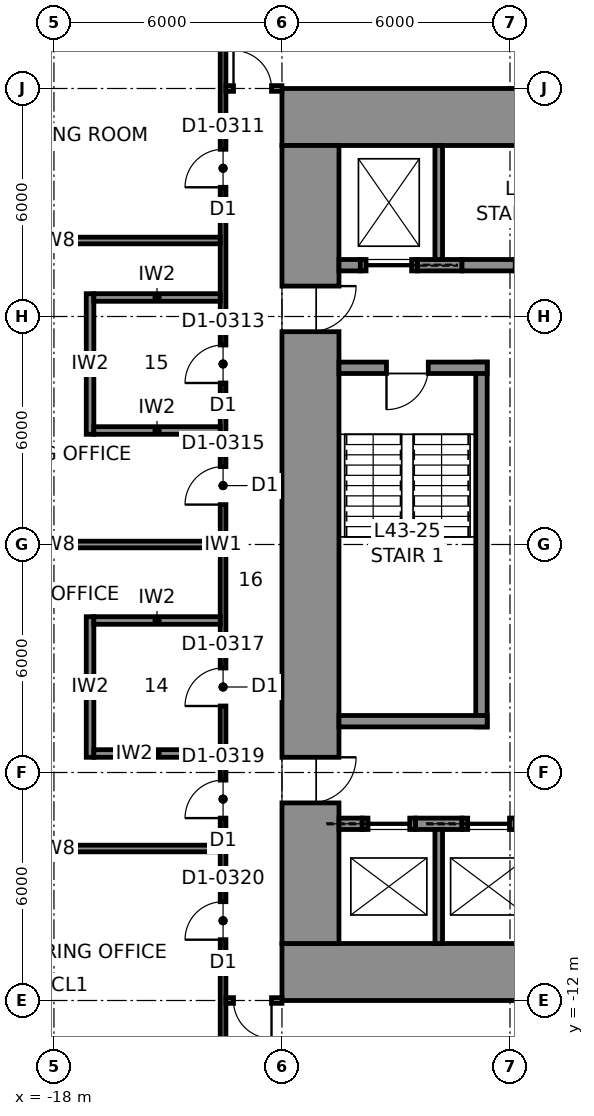
"""IFC4 building model, lengths in metres.
Left out: names, types, materials, properties, quantities, classifications, styles, units other than length and angle.
Written with IfcOpenShell. Run it as: python <this file> out.ifc"""

import sys

from ifc_helpers import new_model, si_unit, direction, frame, frame_2d, origin, place, context, subcontext, project, spatial, rectangle, extrude, element, fill, save


model = new_model("IFC4")
c1 = context("Model", 3, precision=1e-05, world=origin(), true_north=direction((0.0, 1.0)))
c2 = subcontext(c1, "Body", "Model", "MODEL_VIEW")
j1 = project(units=[si_unit("LENGTHUNIT", "METRE"), si_unit("PLANEANGLEUNIT", "RADIAN")], contexts=[c1])
p1 = place(None, origin())
s1 = spatial("IfcSite", under=j1, at=p1, CompositionType="ELEMENT")
p2 = place(p1, origin())
s2 = spatial("IfcBuilding", under=s1, at=p2, CompositionType="ELEMENT")
p3 = place(p2, frame((0.0, 0.0, 201.8)))
s3 = spatial("IfcBuildingStorey", under=s2, at=p3, CompositionType="ELEMENT", Elevation=201.8)
for number, where, z_axis, x_axis in (
    (1, (-12.0, 11.25, 0.0), (0.0, 0.0, 1.0), (1.0, 0.0, 0.0)),
    (2, (12.0, -11.25, 0.0), (0.0, 0.0, 1.0), (-1.0, 0.0, 0.0)),
):
    element("IfcWall", number, at=place(p3, frame(where, z_axis=z_axis, x_axis=x_axis)), inside=s3, PredefinedType="SHEAR", context=c2, shape_type="SweptSolid", body=[
        extrude(rectangle(XDim=24.0, YDim=1.5, at=frame_2d((12.0, 0.0))), origin(), (0.0, 0.0, 1.0), 4.0),
    ])
p4 = place(p3, frame((-11.25, -10.5, 0.0), z_axis=(0.0, 0.0, 1.0), x_axis=(0.0, 1.0, 0.0)))
e3 = element("IfcWall", 3, at=p4, inside=s3, PredefinedType="SHEAR", context=c2, shape_type="SweptSolid", body=[
    extrude(rectangle(XDim=21.0, YDim=1.5, at=frame_2d((10.5, 0.0))), origin(), (0.0, 0.0, 1.0), 4.0),
])
p5 = place(p4, frame((16.1, 0.0, 0.0)))
e4 = element("IfcOpeningElement", 4, at=p5, cuts=e3, PredefinedType="OPENING", context=c2, shape_type="SweptSolid", body=[
    extrude(rectangle(XDim=1.2, YDim=2.3, at=frame_2d((0.6, 1.15))), frame((0.0, 0.76, 0.0), z_axis=(0.0, -1.0, 0.0), x_axis=(1.0, 0.0, 0.0)), (0.0, 0.0, 1.0), 1.52),
])
p6 = place(p4, frame((3.7, 0.0, 0.0)))
e5 = element("IfcOpeningElement", 5, at=p6, cuts=e3, PredefinedType="OPENING", context=c2, shape_type="SweptSolid", body=[
    extrude(rectangle(XDim=1.2, YDim=2.3, at=frame_2d((0.6, 1.15))), frame((0.0, 0.76, 0.0), z_axis=(0.0, -1.0, 0.0), x_axis=(1.0, 0.0, 0.0)), (0.0, 0.0, 1.0), 1.52),
])
p7 = place(p3, frame((-10.5, 7.35, 0.0), z_axis=(0.0, 0.0, 1.0), x_axis=(1.0, 0.0, 0.0)))
e6 = element("IfcWall", 6, at=p7, inside=s3, PredefinedType="SHEAR", context=c2, shape_type="SweptSolid", body=[
    extrude(rectangle(XDim=0.562, YDim=0.3, at=frame_2d((0.281, 0.0))), origin(), (0.0, 0.0, 1.0), 4.0),
])
p8 = place(p3, frame((-8.438, 7.35, 0.0), z_axis=(0.0, 0.0, 1.0), x_axis=(1.0, 0.0, 0.0)))
e7 = element("IfcWall", 7, at=p8, inside=s3, PredefinedType="SHEAR", context=c2, shape_type="SweptSolid", body=[
    extrude(rectangle(XDim=1.175, YDim=0.3, at=frame_2d((0.587, 0.0))), origin(), (0.0, 0.0, 1.0), 4.0),
])
p9 = place(p3, frame((-9.938, 7.35, 0.0), z_axis=(0.0, 0.0, 1.0), x_axis=(1.0, 0.0, 0.0)))
e8 = element("IfcWall", 8, at=p9, inside=s3, PredefinedType="PARTITIONING", context=c2, shape_type="SweptSolid", body=[
    extrude(rectangle(XDim=1.5, YDim=0.3, at=frame_2d((0.75, 0.0))), origin(), (0.0, 0.0, 1.0), 4.0),
])
p10 = place(p9, frame((0.15, 0.0, 0.0)))
e9 = element("IfcOpeningElement", 9, at=p10, cuts=e8, PredefinedType="OPENING", context=c2, shape_type="SweptSolid", body=[
    extrude(rectangle(XDim=1.2, YDim=2.3, at=frame_2d((0.6, 1.15))), frame((0.0, 0.16, 0.0), z_axis=(0.0, -1.0, 0.0), x_axis=(1.0, 0.0, 0.0)), (0.0, 0.0, 1.0), 0.32),
])
p11 = place(p3, frame((-7.262, 7.35, 0.0), z_axis=(0.0, 0.0, 1.0), x_axis=(1.0, 0.0, 0.0)))
e10 = element("IfcWall", 10, at=p11, inside=s3, PredefinedType="PARTITIONING", context=c2, shape_type="SweptSolid", body=[
    extrude(rectangle(XDim=1.4, YDim=0.3, at=frame_2d((0.7, 0.0))), origin(), (0.0, 0.0, 1.0), 4.0),
])
p12 = place(p3, frame((-7.875, 7.5, 0.0), z_axis=(0.0, 0.0, 1.0), x_axis=(0.0, 1.0, 0.0)))
e11 = element("IfcWall", 11, at=p12, inside=s3, PredefinedType="PARTITIONING", context=c2, shape_type="SweptSolid", body=[
    extrude(rectangle(XDim=3.0, YDim=0.2, at=frame_2d((1.5, 0.0))), origin(), (0.0, 0.0, 1.0), 4.0),
])
p13 = place(p3, frame((-10.5, -7.35, 0.0), z_axis=(0.0, 0.0, 1.0), x_axis=(1.0, 0.0, 0.0)))
e12 = element("IfcWall", 12, at=p13, inside=s3, PredefinedType="SHEAR", context=c2, shape_type="SweptSolid", body=[
    extrude(rectangle(XDim=0.613, YDim=0.3, at=frame_2d((0.306, 0.0))), origin(), (0.0, 0.0, 1.0), 4.0),
])
p14 = place(p3, frame((-8.488, -7.35, 0.0), z_axis=(0.0, 0.0, 1.0), x_axis=(1.0, 0.0, 0.0)))
e13 = element("IfcWall", 13, at=p14, inside=s3, PredefinedType="SHEAR", context=c2, shape_type="SweptSolid", body=[
    extrude(rectangle(XDim=1.225, YDim=0.3, at=frame_2d((0.613, 0.0))), origin(), (0.0, 0.0, 1.0), 4.0),
])
p15 = place(p3, frame((-9.887, -7.35, 0.0), z_axis=(0.0, 0.0, 1.0), x_axis=(1.0, 0.0, 0.0)))
e14 = element("IfcWall", 14, at=p15, inside=s3, PredefinedType="PARTITIONING", context=c2, shape_type="SweptSolid", body=[
    extrude(rectangle(XDim=1.4, YDim=0.3, at=frame_2d((0.7, 0.0))), origin(), (0.0, 0.0, 1.0), 4.0),
])
p16 = place(p15, frame((0.15, 0.0, 0.0)))
e15 = element("IfcOpeningElement", 15, at=p16, cuts=e14, PredefinedType="OPENING", context=c2, shape_type="SweptSolid", body=[
    extrude(rectangle(XDim=1.1, YDim=2.3, at=frame_2d((0.55, 1.15))), frame((0.0, 0.16, 0.0), z_axis=(0.0, -1.0, 0.0), x_axis=(1.0, 0.0, 0.0)), (0.0, 0.0, 1.0), 0.32),
])
p17 = place(p3, frame((-7.262, -7.35, 0.0), z_axis=(0.0, 0.0, 1.0), x_axis=(1.0, 0.0, 0.0)))
e16 = element("IfcWall", 16, at=p17, inside=s3, PredefinedType="PARTITIONING", context=c2, shape_type="SweptSolid", body=[
    extrude(rectangle(XDim=1.4, YDim=0.3, at=frame_2d((0.7, 0.0))), origin(), (0.0, 0.0, 1.0), 4.0),
])
p18 = place(p17, frame((0.15, 0.0, 0.0)))
e17 = element("IfcOpeningElement", 17, at=p18, cuts=e16, PredefinedType="OPENING", context=c2, shape_type="SweptSolid", body=[
    extrude(rectangle(XDim=1.1, YDim=2.3, at=frame_2d((0.55, 1.15))), frame((0.0, 0.16, 0.0), z_axis=(0.0, -1.0, 0.0), x_axis=(1.0, 0.0, 0.0)), (0.0, 0.0, 1.0), 0.32),
])
p19 = place(p3, frame((-7.875, -10.5, 0.0), z_axis=(0.0, 0.0, 1.0), x_axis=(0.0, 1.0, 0.0)))
e18 = element("IfcWall", 18, at=p19, inside=s3, PredefinedType="PARTITIONING", context=c2, shape_type="SweptSolid", body=[
    extrude(rectangle(XDim=3.0, YDim=0.2, at=frame_2d((1.5, 0.0))), origin(), (0.0, 0.0, 1.0), 4.0),
])
p20 = place(p3, frame((-13.55, 13.575, 0.0), z_axis=(0.0, 0.0, 1.0), x_axis=(0.0, -1.0, 0.0)))
e19 = element("IfcWall", 19, at=p20, inside=s3, PredefinedType="PARTITIONING", context=c2, shape_type="SweptSolid", body=[
    extrude(rectangle(XDim=27.15, YDim=0.15, at=frame_2d((13.575, 0.0))), origin(), (0.0, 0.0, 1.0), 3.83),
])
p21 = place(p20, frame((22.975, 0.0, 0.0)))
e20 = element("IfcOpeningElement", 20, at=p21, cuts=e19, PredefinedType="OPENING", context=c2, shape_type="SweptSolid", body=[
    extrude(rectangle(XDim=1.0, YDim=2.3, at=frame_2d((0.5, 1.15))), frame((0.0, 0.085, 0.0), z_axis=(0.0, -1.0, 0.0), x_axis=(1.0, 0.0, 0.0)), (0.0, 0.0, 1.0), 0.17),
])
p22 = place(p20, frame((19.775, 0.0, 0.0)))
e21 = element("IfcOpeningElement", 21, at=p22, cuts=e19, PredefinedType="OPENING", context=c2, shape_type="SweptSolid", body=[
    extrude(rectangle(XDim=1.0, YDim=2.3, at=frame_2d((0.5, 1.15))), frame((0.0, 0.085, 0.0), z_axis=(0.0, -1.0, 0.0), x_axis=(1.0, 0.0, 0.0)), (0.0, 0.0, 1.0), 0.17),
])
p23 = place(p20, frame((11.525, 0.0, 0.0)))
e22 = element("IfcOpeningElement", 22, at=p23, cuts=e19, PredefinedType="OPENING", context=c2, shape_type="SweptSolid", body=[
    extrude(rectangle(XDim=1.0, YDim=2.3, at=frame_2d((0.5, 1.15))), frame((0.0, 0.085, 0.0), z_axis=(0.0, -1.0, 0.0), x_axis=(1.0, 0.0, 0.0)), (0.0, 0.0, 1.0), 0.17),
])
p24 = place(p20, frame((3.175, 0.0, 0.0)))
e23 = element("IfcOpeningElement", 23, at=p24, cuts=e19, PredefinedType="OPENING", context=c2, shape_type="SweptSolid", body=[
    extrude(rectangle(XDim=1.0, YDim=2.3, at=frame_2d((0.5, 1.15))), frame((0.0, 0.085, 0.0), z_axis=(0.0, -1.0, 0.0), x_axis=(1.0, 0.0, 0.0)), (0.0, 0.0, 1.0), 0.17),
])
p25 = place(p20, frame((16.825, 0.0, 0.0)))
e24 = element("IfcOpeningElement", 24, at=p25, cuts=e19, PredefinedType="OPENING", context=c2, shape_type="SweptSolid", body=[
    extrude(rectangle(XDim=1.0, YDim=2.3, at=frame_2d((0.5, 1.15))), frame((0.0, 0.085, 0.0), z_axis=(0.0, -1.0, 0.0), x_axis=(1.0, 0.0, 0.0)), (0.0, 0.0, 1.0), 0.17),
])
p26 = place(p20, frame((8.325, 0.0, 0.0)))
e25 = element("IfcOpeningElement", 25, at=p26, cuts=e19, PredefinedType="OPENING", context=c2, shape_type="SweptSolid", body=[
    extrude(rectangle(XDim=1.0, YDim=2.3, at=frame_2d((0.5, 1.15))), frame((0.0, 0.085, 0.0), z_axis=(0.0, -1.0, 0.0), x_axis=(1.0, 0.0, 0.0)), (0.0, 0.0, 1.0), 0.17),
])
p27 = place(p3, frame((-13.475, 12.0, 0.0), z_axis=(0.0, 0.0, 1.0), x_axis=(1.0, 0.0, 0.0)))
e26 = element("IfcWall", 26, at=p27, inside=s3, PredefinedType="PARTITIONING", context=c2, shape_type="SweptSolid", body=[
    extrude(rectangle(XDim=1.475, YDim=0.15, at=frame_2d((0.738, 0.0))), origin(), (0.0, 0.0, 1.0), 3.83),
])
p28 = place(p27, frame((0.2, 0.0, 0.0)))
e27 = element("IfcOpeningElement", 27, at=p28, cuts=e26, PredefinedType="OPENING", context=c2, shape_type="SweptSolid", body=[
    extrude(rectangle(XDim=1.0, YDim=2.3, at=frame_2d((0.5, 1.15))), frame((0.0, 0.085, 0.0), z_axis=(0.0, -1.0, 0.0), x_axis=(1.0, 0.0, 0.0)), (0.0, 0.0, 1.0), 0.17),
])
p29 = place(p3, frame((-12.0, -12.0, 0.0), z_axis=(0.0, 0.0, 1.0), x_axis=(-1.0, 0.0, 0.0)))
e28 = element("IfcWall", 28, at=p29, inside=s3, PredefinedType="PARTITIONING", context=c2, shape_type="SweptSolid", body=[
    extrude(rectangle(XDim=1.475, YDim=0.15, at=frame_2d((0.738, 0.0))), origin(), (0.0, 0.0, 1.0), 3.83),
])
p30 = place(p29, frame((0.275, 0.0, 0.0)))
e29 = element("IfcOpeningElement", 29, at=p30, cuts=e28, PredefinedType="OPENING", context=c2, shape_type="SweptSolid", body=[
    extrude(rectangle(XDim=1.0, YDim=2.3, at=frame_2d((0.5, 1.15))), frame((0.0, 0.085, 0.0), z_axis=(0.0, -1.0, 0.0), x_axis=(1.0, 0.0, 0.0)), (0.0, 0.0, 1.0), 0.17),
])
for number, where, z_axis, x_axis in (
    (30, (-13.625, -8.0, 0.0), (0.0, 0.0, 1.0), (-1.0, 0.0, 0.0)),
    (31, (-13.625, 0.0, 0.0), (0.0, 0.0, 1.0), (-1.0, 0.0, 0.0)),
    (32, (-13.625, 8.0, 0.0), (0.0, 0.0, 1.0), (-1.0, 0.0, 0.0)),
):
    element("IfcWall", number, at=place(p3, frame(where, z_axis=z_axis, x_axis=x_axis)), inside=s3, PredefinedType="PARTITIONING", context=c2, shape_type="SweptSolid", body=[
        extrude(rectangle(XDim=8.609, YDim=0.175, at=frame_2d((4.305, 0.0))), origin(), (0.0, 0.0, 1.0), 2.94),
    ])
p31 = place(p3, frame((-17.05, -5.6, 0.0), z_axis=(0.0, 0.0, 1.0), x_axis=(0.0, 1.0, 0.0)))
e33 = element("IfcWall", 33, at=p31, inside=s3, PredefinedType="PARTITIONING", context=c2, shape_type="SweptSolid", body=[
    extrude(rectangle(XDim=3.7, YDim=0.2, at=frame_2d((1.85, 0.0))), origin(), (0.0, 0.0, 1.0), 3.83),
])
for number, where, z_axis, x_axis in (
    (34, (-13.625, -5.5, 0.0), (0.0, 0.0, 1.0), (-1.0, 0.0, 0.0)),
    (35, (-13.625, -2.0, 0.0), (0.0, 0.0, 1.0), (-1.0, 0.0, 0.0)),
):
    element("IfcWall", number, at=place(p3, frame(where, z_axis=z_axis, x_axis=x_axis)), inside=s3, PredefinedType="PARTITIONING", context=c2, shape_type="SweptSolid", body=[
        extrude(rectangle(XDim=3.325, YDim=0.2, at=frame_2d((1.663, 0.0))), origin(), (0.0, 0.0, 1.0), 3.83),
    ])
p32 = place(p3, frame((-17.05, 2.9, 0.0), z_axis=(0.0, 0.0, 1.0), x_axis=(0.0, 1.0, 0.0)))
e36 = element("IfcWall", 36, at=p32, inside=s3, PredefinedType="PARTITIONING", context=c2, shape_type="SweptSolid", body=[
    extrude(rectangle(XDim=3.7, YDim=0.2, at=frame_2d((1.85, 0.0))), origin(), (0.0, 0.0, 1.0), 3.83),
])
for number, where, z_axis, x_axis in (
    (37, (-13.625, 3.0, 0.0), (0.0, 0.0, 1.0), (-1.0, 0.0, 0.0)),
    (38, (-13.625, 6.5, 0.0), (0.0, 0.0, 1.0), (-1.0, 0.0, 0.0)),
):
    element("IfcWall", number, at=place(p3, frame(where, z_axis=z_axis, x_axis=x_axis)), inside=s3, PredefinedType="PARTITIONING", context=c2, shape_type="SweptSolid", body=[
        extrude(rectangle(XDim=3.325, YDim=0.2, at=frame_2d((1.663, 0.0))), origin(), (0.0, 0.0, 1.0), 3.83),
    ])
p33 = place(p3, frame((-6.75, -4.8, 0.0), z_axis=(0.0, 0.0, 1.0), x_axis=(0.0, 1.0, 0.0)))
e39 = element("IfcWall", 39, at=p33, inside=s3, PredefinedType="SOLIDWALL", context=c2, shape_type="SweptSolid", body=[
    extrude(rectangle(XDim=9.6, YDim=0.3, at=frame_2d((4.8, 0.0))), origin(), (0.0, 0.0, 1.0), 3.75),
])
p34 = place(p3, frame((-10.5, 4.65, 0.0), z_axis=(0.0, 0.0, 1.0), x_axis=(1.0, 0.0, 0.0)))
e40 = element("IfcWall", 40, at=p34, inside=s3, PredefinedType="SOLIDWALL", context=c2, shape_type="SweptSolid", body=[
    extrude(rectangle(XDim=3.9, YDim=0.3, at=frame_2d((1.95, 0.0))), origin(), (0.0, 0.0, 1.0), 3.75),
])
p35 = place(p34, frame((1.25, 0.0, 0.0)))
e41 = element("IfcOpeningElement", 41, at=p35, cuts=e40, PredefinedType="OPENING", context=c2, shape_type="SweptSolid", body=[
    extrude(rectangle(XDim=1.1, YDim=2.3, at=frame_2d((0.55, 1.15))), frame((0.0, 0.16, 0.0), z_axis=(0.0, -1.0, 0.0), x_axis=(1.0, 0.0, 0.0)), (0.0, 0.0, 1.0), 0.32),
])
p36 = place(p3, frame((-6.6, -4.65, 0.0), z_axis=(0.0, 0.0, 1.0), x_axis=(-1.0, 0.0, 0.0)))
e42 = element("IfcWall", 42, at=p36, inside=s3, PredefinedType="SOLIDWALL", context=c2, shape_type="SweptSolid", body=[
    extrude(rectangle(XDim=3.9, YDim=0.3, at=frame_2d((1.95, 0.0))), origin(), (0.0, 0.0, 1.0), 3.75),
])
p37 = place(p28, origin())
e43 = element("IfcDoor", 43, at=p37, inside=s3, OperationType="SINGLE_SWING_LEFT", PredefinedType="DOOR", context=c2, shape_type="SweptSolid", body=[
    extrude(rectangle(XDim=1.0, YDim=2.3, at=frame_2d((0.5, 1.15))), frame((0.0, 0.025, 0.0), z_axis=(0.0, -1.0, 0.0), x_axis=(1.0, 0.0, 0.0)), (0.0, 0.0, 1.0), 0.05),
])
fill(e27, e43)
p38 = place(p30, origin())
e44 = element("IfcDoor", 44, at=p38, inside=s3, OperationType="SINGLE_SWING_LEFT", PredefinedType="DOOR", context=c2, shape_type="SweptSolid", body=[
    extrude(rectangle(XDim=1.0, YDim=2.3, at=frame_2d((0.5, 1.15))), frame((0.0, 0.025, 0.0), z_axis=(0.0, -1.0, 0.0), x_axis=(1.0, 0.0, 0.0)), (0.0, 0.0, 1.0), 0.05),
])
fill(e29, e44)
p39 = place(p21, frame((1.0, 0.0, 0.0), z_axis=(0.0, 0.0, 1.0), x_axis=(-1.0, 0.0, 0.0)))
e45 = element("IfcDoor", 45, at=p39, inside=s3, OperationType="SINGLE_SWING_LEFT", PredefinedType="DOOR", context=c2, shape_type="SweptSolid", body=[
    extrude(rectangle(XDim=1.0, YDim=2.3, at=frame_2d((0.5, 1.15))), frame((0.0, 0.025, 0.0), z_axis=(0.0, -1.0, 0.0), x_axis=(1.0, 0.0, 0.0)), (0.0, 0.0, 1.0), 0.05),
])
fill(e20, e45)
p40 = place(p22, frame((1.0, 0.0, 0.0), z_axis=(0.0, 0.0, 1.0), x_axis=(-1.0, 0.0, 0.0)))
e46 = element("IfcDoor", 46, at=p40, inside=s3, OperationType="SINGLE_SWING_LEFT", PredefinedType="DOOR", context=c2, shape_type="SweptSolid", body=[
    extrude(rectangle(XDim=1.0, YDim=2.3, at=frame_2d((0.5, 1.15))), frame((0.0, 0.025, 0.0), z_axis=(0.0, -1.0, 0.0), x_axis=(1.0, 0.0, 0.0)), (0.0, 0.0, 1.0), 0.05),
])
fill(e21, e46)
p41 = place(p23, frame((1.0, 0.0, 0.0), z_axis=(0.0, 0.0, 1.0), x_axis=(-1.0, 0.0, 0.0)))
e47 = element("IfcDoor", 47, at=p41, inside=s3, OperationType="SINGLE_SWING_LEFT", PredefinedType="DOOR", context=c2, shape_type="SweptSolid", body=[
    extrude(rectangle(XDim=1.0, YDim=2.3, at=frame_2d((0.5, 1.15))), frame((0.0, 0.025, 0.0), z_axis=(0.0, -1.0, 0.0), x_axis=(1.0, 0.0, 0.0)), (0.0, 0.0, 1.0), 0.05),
])
fill(e22, e47)
p42 = place(p24, frame((1.0, 0.0, 0.0), z_axis=(0.0, 0.0, 1.0), x_axis=(-1.0, 0.0, 0.0)))
e48 = element("IfcDoor", 48, at=p42, inside=s3, OperationType="SINGLE_SWING_LEFT", PredefinedType="DOOR", context=c2, shape_type="SweptSolid", body=[
    extrude(rectangle(XDim=1.0, YDim=2.3, at=frame_2d((0.5, 1.15))), frame((0.0, 0.025, 0.0), z_axis=(0.0, -1.0, 0.0), x_axis=(1.0, 0.0, 0.0)), (0.0, 0.0, 1.0), 0.05),
])
fill(e23, e48)
p43 = place(p25, frame((1.0, 0.0, 0.0), z_axis=(0.0, 0.0, 1.0), x_axis=(-1.0, 0.0, 0.0)))
e49 = element("IfcDoor", 49, at=p43, inside=s3, OperationType="SINGLE_SWING_LEFT", PredefinedType="DOOR", context=c2, shape_type="SweptSolid", body=[
    extrude(rectangle(XDim=1.0, YDim=2.3, at=frame_2d((0.5, 1.15))), frame((0.0, 0.025, 0.0), z_axis=(0.0, -1.0, 0.0), x_axis=(1.0, 0.0, 0.0)), (0.0, 0.0, 1.0), 0.05),
])
fill(e24, e49)
p44 = place(p26, frame((1.0, 0.0, 0.0), z_axis=(0.0, 0.0, 1.0), x_axis=(-1.0, 0.0, 0.0)))
e50 = element("IfcDoor", 50, at=p44, inside=s3, OperationType="SINGLE_SWING_LEFT", PredefinedType="DOOR", context=c2, shape_type="SweptSolid", body=[
    extrude(rectangle(XDim=1.0, YDim=2.3, at=frame_2d((0.5, 1.15))), frame((0.0, 0.025, 0.0), z_axis=(0.0, -1.0, 0.0), x_axis=(1.0, 0.0, 0.0)), (0.0, 0.0, 1.0), 0.05),
])
fill(e25, e50)
p45 = place(p35, frame((1.1, 0.0, 0.0), z_axis=(0.0, 0.0, 1.0), x_axis=(-1.0, 0.0, 0.0)))
e51 = element("IfcDoor", 51, at=p45, inside=s3, OperationType="SINGLE_SWING_RIGHT", PredefinedType="DOOR", context=c2, shape_type="SweptSolid", body=[
    extrude(rectangle(XDim=1.1, YDim=2.3, at=frame_2d((0.55, 1.15))), frame((0.0, 0.025, 0.0), z_axis=(0.0, -1.0, 0.0), x_axis=(1.0, 0.0, 0.0)), (0.0, 0.0, 1.0), 0.05),
])
fill(e41, e51)
p46 = place(p5, frame((1.2, 0.0, 0.0), z_axis=(0.0, 0.0, 1.0), x_axis=(-1.0, 0.0, 0.0)))
e52 = element("IfcDoor", 52, at=p46, inside=s3, OperationType="SINGLE_SWING_LEFT", PredefinedType="DOOR", context=c2, shape_type="SweptSolid", body=[
    extrude(rectangle(XDim=1.2, YDim=2.3, at=frame_2d((0.6, 1.15))), frame((0.0, 0.025, 0.0), z_axis=(0.0, -1.0, 0.0), x_axis=(1.0, 0.0, 0.0)), (0.0, 0.0, 1.0), 0.05),
])
fill(e4, e52)
p47 = place(p6, frame((1.2, 0.0, 0.0), z_axis=(0.0, 0.0, 1.0), x_axis=(-1.0, 0.0, 0.0)))
e53 = element("IfcDoor", 53, at=p47, inside=s3, OperationType="SINGLE_SWING_LEFT", PredefinedType="DOOR", context=c2, shape_type="SweptSolid", body=[
    extrude(rectangle(XDim=1.2, YDim=2.3, at=frame_2d((0.6, 1.15))), frame((0.0, 0.025, 0.0), z_axis=(0.0, -1.0, 0.0), x_axis=(1.0, 0.0, 0.0)), (0.0, 0.0, 1.0), 0.05),
])
fill(e5, e53)
p48 = place(p10, frame((1.2, 0.0, 0.0), z_axis=(0.0, 0.0, 1.0), x_axis=(-1.0, 0.0, 0.0)))
e54 = element("IfcDoor", 54, at=p48, inside=s3, OperationType="SLIDING_TO_LEFT", PredefinedType="DOOR", context=c2, shape_type="SweptSolid", body=[
    extrude(rectangle(XDim=1.2, YDim=2.3, at=frame_2d((0.6, 1.15))), frame((0.0, 0.025, 0.0), z_axis=(0.0, -1.0, 0.0), x_axis=(1.0, 0.0, 0.0)), (0.0, 0.0, 1.0), 0.05),
])
fill(e9, e54)
p49 = place(p18, origin())
e55 = element("IfcDoor", 55, at=p49, inside=s3, OperationType="SLIDING_TO_LEFT", PredefinedType="DOOR", context=c2, shape_type="SweptSolid", body=[
    extrude(rectangle(XDim=1.1, YDim=2.3, at=frame_2d((0.55, 1.15))), frame((0.0, 0.025, 0.0), z_axis=(0.0, -1.0, 0.0), x_axis=(1.0, 0.0, 0.0)), (0.0, 0.0, 1.0), 0.05),
])
fill(e17, e55)
p50 = place(p16, origin())
e56 = element("IfcDoor", 56, at=p50, inside=s3, OperationType="SLIDING_TO_LEFT", PredefinedType="DOOR", context=c2, shape_type="SweptSolid", body=[
    extrude(rectangle(XDim=1.1, YDim=2.3, at=frame_2d((0.55, 1.15))), frame((0.0, 0.025, 0.0), z_axis=(0.0, -1.0, 0.0), x_axis=(1.0, 0.0, 0.0)), (0.0, 0.0, 1.0), 0.05),
])
fill(e15, e56)
save(model, sys.argv[1])
